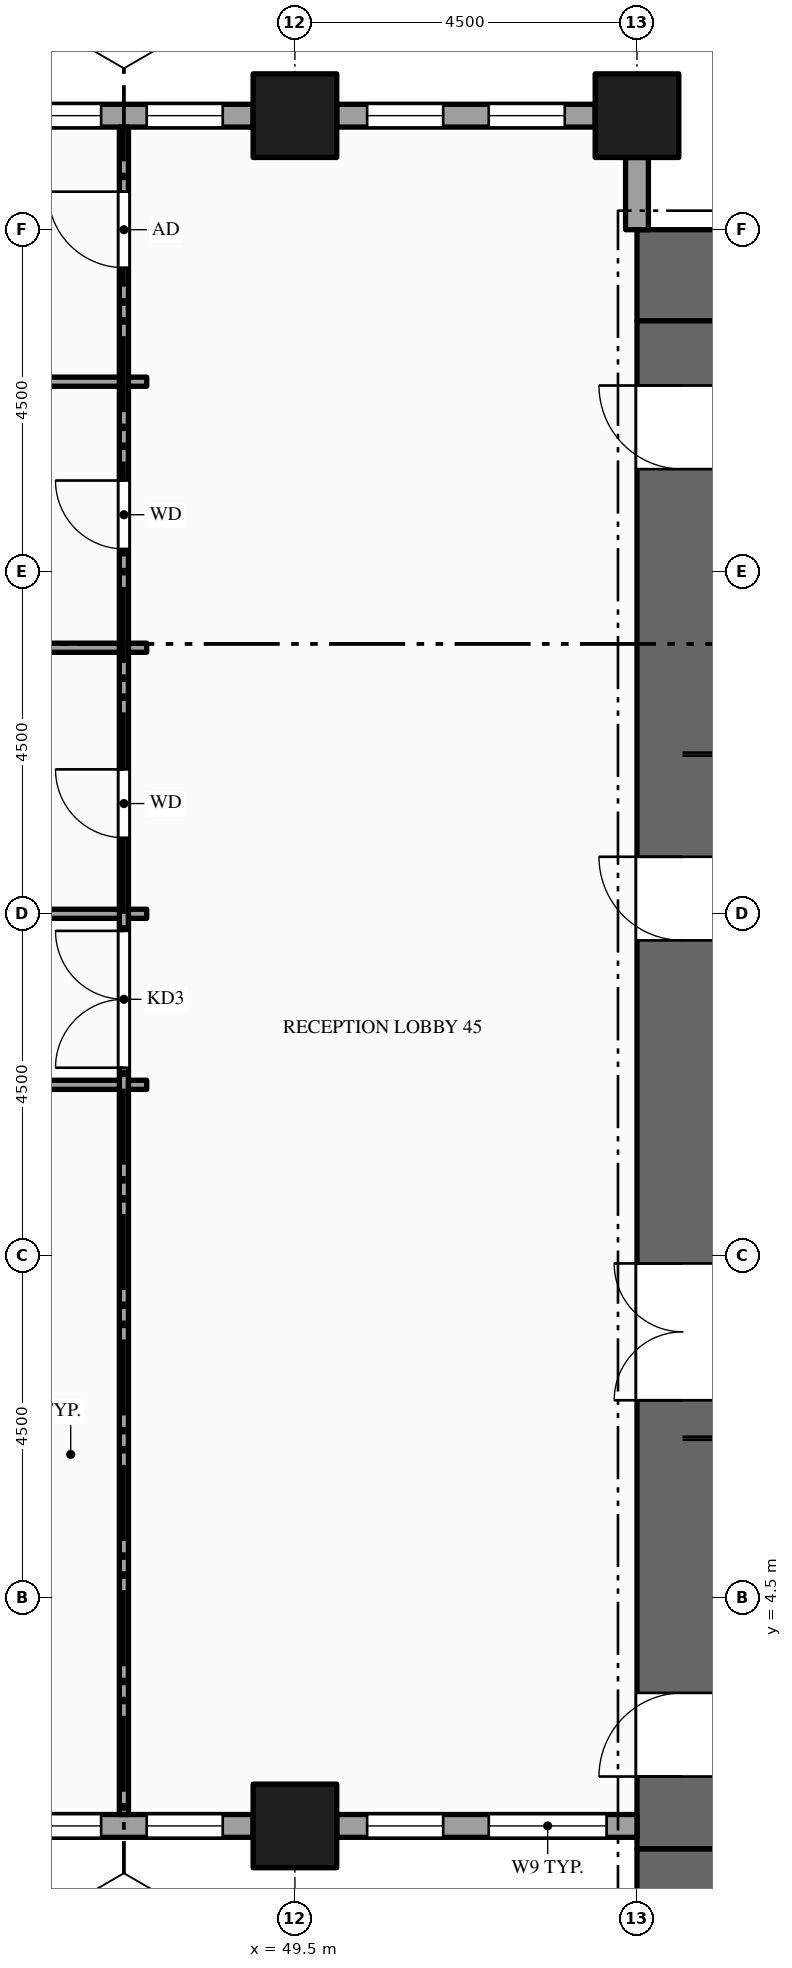
"""IFC4 building model, lengths in metres.
Left out: names, types, materials, properties, quantities, classifications, styles, units other than length and angle.
Written with IfcOpenShell. Run it as: python <this file> out.ifc"""

import sys

from ifc_helpers import new_model, si_unit, direction, frame, frame_2d, origin, origin_2d, place, context, subcontext, project, spatial, rectangle, hollow_rectangle, extrude, element, fill, save


model = new_model("IFC4")
c1 = context("Model", 3, precision=1e-05, world=origin(), true_north=direction((0.0, 1.0)))
c2 = subcontext(c1, "Body", "Model", "MODEL_VIEW")
j1 = project(units=[si_unit("LENGTHUNIT", "METRE"), si_unit("PLANEANGLEUNIT", "RADIAN")], contexts=[c1])
p1 = place(None, origin())
s1 = spatial("IfcSite", under=j1, at=p1, CompositionType="ELEMENT")
p2 = place(p1, origin())
s2 = spatial("IfcBuilding", under=s1, at=p2, CompositionType="ELEMENT")
p3 = place(p2, frame((0.0, 0.0, 41.0)))
s3 = spatial("IfcBuildingStorey", under=s2, at=p3, CompositionType="ELEMENT", Elevation=41.0)
for number, where, z_axis, x_axis in (
    (1, (67.5, 0.6, -0.15), (0.0, 0.0, 1.0), (-1.0, 0.0, 0.0)),
    (2, (54.0, 21.9, -0.15), (0.0, 0.0, 1.0), (1.0, 0.0, 0.0)),
):
    element("IfcWall", number, at=place(p3, frame(where, z_axis=z_axis, x_axis=x_axis)), inside=s3, PredefinedType="SHEAR", context=c2, shape_type="SweptSolid", body=[
        extrude(rectangle(XDim=13.5, YDim=1.2, at=frame_2d((6.75, 0.0))), origin(), (0.0, 0.0, 1.0), 4.0),
    ])
p4 = place(p3, frame((54.6, 1.2, -0.15), z_axis=(0.0, 0.0, 1.0), x_axis=(0.0, 1.0, 0.0)))
e3 = element("IfcWall", 3, at=p4, inside=s3, PredefinedType="SHEAR", context=c2, shape_type="SweptSolid", body=[
    extrude(rectangle(XDim=20.1, YDim=1.2, at=frame_2d((10.05, 0.0))), origin(), (0.0, 0.0, 1.0), 4.0),
])
p5 = place(p4, frame((5.9, 0.0, 0.15)))
e4 = element("IfcOpeningElement", 4, at=p5, cuts=e3, PredefinedType="OPENING", context=c2, shape_type="SweptSolid", body=[
    extrude(rectangle(XDim=1.8, YDim=2.1, at=frame_2d((0.9, 1.05))), frame((0.0, 0.61, 0.0), z_axis=(0.0, -1.0, 0.0), x_axis=(1.0, 0.0, 0.0)), (0.0, 0.0, 1.0), 1.22),
])
p6 = place(p4, frame((11.95, 0.0, 0.15)))
e5 = element("IfcOpeningElement", 5, at=p6, cuts=e3, PredefinedType="OPENING", context=c2, shape_type="SweptSolid", body=[
    extrude(rectangle(XDim=1.1, YDim=2.1, at=frame_2d((0.55, 1.05))), frame((0.0, 0.61, 0.0), z_axis=(0.0, -1.0, 0.0), x_axis=(1.0, 0.0, 0.0)), (0.0, 0.0, 1.0), 1.22),
])
p7 = place(p4, frame((0.95, 0.0, 0.15)))
e6 = element("IfcOpeningElement", 6, at=p7, cuts=e3, PredefinedType="OPENING", context=c2, shape_type="SweptSolid", body=[
    extrude(rectangle(XDim=1.1, YDim=2.1, at=frame_2d((0.55, 1.05))), frame((0.0, 0.61, 0.0), z_axis=(0.0, -1.0, 0.0), x_axis=(1.0, 0.0, 0.0)), (0.0, 0.0, 1.0), 1.22),
])
p8 = place(p4, frame((18.15, 0.0, 0.15)))
e7 = element("IfcOpeningElement", 7, at=p8, cuts=e3, PredefinedType="OPENING", context=c2, shape_type="SweptSolid", body=[
    extrude(rectangle(XDim=1.1, YDim=2.1, at=frame_2d((0.55, 1.05))), frame((0.0, 0.61, 0.0), z_axis=(0.0, -1.0, 0.0), x_axis=(1.0, 0.0, 0.0)), (0.0, 0.0, 1.0), 1.22),
])
for number, where, z_axis, x_axis in (
    (8, (49.5, 1.5, -0.15), (0.0, 0.0, 1.0), (1.0, 0.0, 0.0)),
    (9, (49.5, 24.0, -0.15), (0.0, 0.0, 1.0), (1.0, 0.0, 0.0)),
    (10, (54.0, 24.0, -0.15), (0.0, 0.0, 1.0), (1.0, 0.0, 0.0)),
):
    element("IfcColumn", number, at=place(p3, frame(where, z_axis=z_axis, x_axis=x_axis)), inside=s3, PredefinedType="COLUMN", context=c2, shape_type="SweptSolid", body=[
        extrude(hollow_rectangle(XDim=1.1, YDim=1.1, WallThickness=0.06, at=origin_2d()), origin(), (0.0, 0.0, 1.0), 4.0),
    ])
p9 = place(p3, frame((45.55, 1.5, 0.0), z_axis=(0.0, 0.0, 1.0), x_axis=(1.0, 0.0, 0.0)))
e11 = element("IfcWall", 11, at=p9, inside=s3, PredefinedType="STANDARD", context=c2, shape_type="SweptSolid", body=[
    extrude(rectangle(XDim=3.4, YDim=0.3, at=frame_2d((1.7, 0.0))), origin(), (0.0, 0.0, 1.0), 3.144),
])
p10 = place(p9, frame((0.4, 0.0, 0.9)))
e12 = element("IfcOpeningElement", 12, at=p10, cuts=e11, PredefinedType="OPENING", context=c2, shape_type="SweptSolid", body=[
    extrude(rectangle(XDim=1.0, YDim=2.0, at=frame_2d((0.5, 1.0))), frame((0.0, 0.16, 0.0), z_axis=(0.0, -1.0, 0.0), x_axis=(1.0, 0.0, 0.0)), (0.0, 0.0, 1.0), 0.32),
])
p11 = place(p9, frame((2.0, 0.0, 0.9)))
e13 = element("IfcOpeningElement", 13, at=p11, cuts=e11, PredefinedType="OPENING", context=c2, shape_type="SweptSolid", body=[
    extrude(rectangle(XDim=1.0, YDim=2.0, at=frame_2d((0.5, 1.0))), frame((0.0, 0.16, 0.0), z_axis=(0.0, -1.0, 0.0), x_axis=(1.0, 0.0, 0.0)), (0.0, 0.0, 1.0), 0.32),
])
p12 = place(p3, frame((50.05, 1.5, 0.0), z_axis=(0.0, 0.0, 1.0), x_axis=(1.0, 0.0, 0.0)))
e14 = element("IfcWall", 14, at=p12, inside=s3, PredefinedType="STANDARD", context=c2, shape_type="SweptSolid", body=[
    extrude(rectangle(XDim=3.95, YDim=0.3, at=frame_2d((1.975, 0.0))), origin(), (0.0, 0.0, 1.0), 3.144),
])
p13 = place(p12, frame((0.4, 0.0, 0.9)))
e15 = element("IfcOpeningElement", 15, at=p13, cuts=e14, PredefinedType="OPENING", context=c2, shape_type="SweptSolid", body=[
    extrude(rectangle(XDim=1.0, YDim=2.0, at=frame_2d((0.5, 1.0))), frame((0.0, 0.16, 0.0), z_axis=(0.0, -1.0, 0.0), x_axis=(1.0, 0.0, 0.0)), (0.0, 0.0, 1.0), 0.32),
])
p14 = place(p12, frame((2.0, 0.0, 0.9)))
e16 = element("IfcOpeningElement", 16, at=p14, cuts=e14, PredefinedType="OPENING", context=c2, shape_type="SweptSolid", body=[
    extrude(rectangle(XDim=1.55, YDim=2.0, at=frame_2d((0.775, 1.0))), frame((0.0, 0.16, 0.0), z_axis=(0.0, -1.0, 0.0), x_axis=(1.0, 0.0, 0.0)), (0.0, 0.0, 1.0), 0.32),
])
p15 = place(p3, frame((54.0, 22.5, 0.0), z_axis=(0.0, 0.0, 1.0), x_axis=(0.0, 1.0, 0.0)))
e17 = element("IfcWall", 17, at=p15, inside=s3, PredefinedType="STANDARD", context=c2, shape_type="SweptSolid", body=[
    extrude(rectangle(XDim=0.95, YDim=0.3, at=frame_2d((0.475, 0.0))), origin(), (0.0, 0.0, 1.0), 3.144),
])
p16 = place(p3, frame((53.45, 24.0, 0.0), z_axis=(0.0, 0.0, 1.0), x_axis=(-1.0, 0.0, 0.0)))
e18 = element("IfcWall", 18, at=p16, inside=s3, PredefinedType="STANDARD", context=c2, shape_type="SweptSolid", body=[
    extrude(rectangle(XDim=3.4, YDim=0.3, at=frame_2d((1.7, 0.0))), origin(), (0.0, 0.0, 1.0), 3.144),
])
p17 = place(p16, frame((0.4, 0.0, 0.9)))
e19 = element("IfcOpeningElement", 19, at=p17, cuts=e18, PredefinedType="OPENING", context=c2, shape_type="SweptSolid", body=[
    extrude(rectangle(XDim=1.0, YDim=2.0, at=frame_2d((0.5, 1.0))), frame((0.0, 0.16, 0.0), z_axis=(0.0, -1.0, 0.0), x_axis=(1.0, 0.0, 0.0)), (0.0, 0.0, 1.0), 0.32),
])
p18 = place(p16, frame((2.0, 0.0, 0.9)))
e20 = element("IfcOpeningElement", 20, at=p18, cuts=e18, PredefinedType="OPENING", context=c2, shape_type="SweptSolid", body=[
    extrude(rectangle(XDim=1.0, YDim=2.0, at=frame_2d((0.5, 1.0))), frame((0.0, 0.16, 0.0), z_axis=(0.0, -1.0, 0.0), x_axis=(1.0, 0.0, 0.0)), (0.0, 0.0, 1.0), 0.32),
])
p19 = place(p3, frame((48.95, 24.0, 0.0), z_axis=(0.0, 0.0, 1.0), x_axis=(-1.0, 0.0, 0.0)))
e21 = element("IfcWall", 21, at=p19, inside=s3, PredefinedType="STANDARD", context=c2, shape_type="SweptSolid", body=[
    extrude(rectangle(XDim=3.4, YDim=0.3, at=frame_2d((1.7, 0.0))), origin(), (0.0, 0.0, 1.0), 3.144),
])
p20 = place(p19, frame((0.4, 0.0, 0.9)))
e22 = element("IfcOpeningElement", 22, at=p20, cuts=e21, PredefinedType="OPENING", context=c2, shape_type="SweptSolid", body=[
    extrude(rectangle(XDim=1.0, YDim=2.0, at=frame_2d((0.5, 1.0))), frame((0.0, 0.16, 0.0), z_axis=(0.0, -1.0, 0.0), x_axis=(1.0, 0.0, 0.0)), (0.0, 0.0, 1.0), 0.32),
])
p21 = place(p19, frame((2.0, 0.0, 0.9)))
e23 = element("IfcOpeningElement", 23, at=p21, cuts=e21, PredefinedType="OPENING", context=c2, shape_type="SweptSolid", body=[
    extrude(rectangle(XDim=1.0, YDim=2.0, at=frame_2d((0.5, 1.0))), frame((0.0, 0.16, 0.0), z_axis=(0.0, -1.0, 0.0), x_axis=(1.0, 0.0, 0.0)), (0.0, 0.0, 1.0), 0.32),
])
p22 = place(p3, frame((47.25, 1.65, 0.0), z_axis=(0.0, 0.0, 1.0), x_axis=(0.0, 1.0, 0.0)))
e24 = element("IfcWall", 24, at=p22, inside=s3, PredefinedType="PARTITIONING", context=c2, shape_type="SweptSolid", body=[
    extrude(rectangle(XDim=22.2, YDim=0.12, at=frame_2d((11.1, 0.0))), origin(), (0.0, 0.0, 1.0), 2.938),
])
p23 = place(p22, frame((9.825, 0.0, 0.0)))
e25 = element("IfcOpeningElement", 25, at=p23, cuts=e24, PredefinedType="OPENING", context=c2, shape_type="SweptSolid", body=[
    extrude(rectangle(XDim=1.8, YDim=2.1, at=frame_2d((0.9, 1.05))), frame((0.0, 0.07, 0.0), z_axis=(0.0, -1.0, 0.0), x_axis=(1.0, 0.0, 0.0)), (0.0, 0.0, 1.0), 0.14),
])
p24 = place(p22, frame((12.85, 0.0, 0.0)))
e26 = element("IfcOpeningElement", 26, at=p24, cuts=e24, PredefinedType="OPENING", context=c2, shape_type="SweptSolid", body=[
    extrude(rectangle(XDim=0.9, YDim=2.1, at=frame_2d((0.45, 1.05))), frame((0.0, 0.07, 0.0), z_axis=(0.0, -1.0, 0.0), x_axis=(1.0, 0.0, 0.0)), (0.0, 0.0, 1.0), 0.14),
])
p25 = place(p22, frame((16.65, 0.0, 0.0)))
e27 = element("IfcOpeningElement", 27, at=p25, cuts=e24, PredefinedType="OPENING", context=c2, shape_type="SweptSolid", body=[
    extrude(rectangle(XDim=0.9, YDim=2.1, at=frame_2d((0.45, 1.05))), frame((0.0, 0.07, 0.0), z_axis=(0.0, -1.0, 0.0), x_axis=(1.0, 0.0, 0.0)), (0.0, 0.0, 1.0), 0.14),
])
p26 = place(p22, frame((20.35, 0.0, 0.0)))
e28 = element("IfcOpeningElement", 28, at=p26, cuts=e24, PredefinedType="OPENING", context=c2, shape_type="SweptSolid", body=[
    extrude(rectangle(XDim=1.0, YDim=2.1, at=frame_2d((0.5, 1.05))), frame((0.0, 0.07, 0.0), z_axis=(0.0, -1.0, 0.0), x_axis=(1.0, 0.0, 0.0)), (0.0, 0.0, 1.0), 0.14),
])
p27 = place(p3, frame((42.81, 11.25, 0.0), z_axis=(0.0, 0.0, 1.0), x_axis=(1.0, 0.0, 0.0)))
e29 = element("IfcWall", 29, at=p27, inside=s3, PredefinedType="PARTITIONING", context=c2, shape_type="SweptSolid", body=[
    extrude(rectangle(XDim=4.38, YDim=0.12, at=frame_2d((2.19, 0.0))), origin(), (0.0, 0.0, 1.0), 2.938),
])
p28 = place(p27, frame((1.59, 0.0, 0.0)))
e30 = element("IfcOpeningElement", 30, at=p28, cuts=e29, PredefinedType="OPENING", context=c2, shape_type="SweptSolid", body=[
    extrude(rectangle(XDim=1.2, YDim=2.1, at=frame_2d((0.6, 1.05))), frame((0.0, 0.07, 0.0), z_axis=(0.0, -1.0, 0.0), x_axis=(1.0, 0.0, 0.0)), (0.0, 0.0, 1.0), 0.14),
])
p29 = place(p3, frame((47.31, 11.25, 0.0), z_axis=(0.0, 0.0, 1.0), x_axis=(1.0, 0.0, 0.0)))
e31 = element("IfcWall", 31, at=p29, inside=s3, PredefinedType="PARTITIONING", context=c2, shape_type="SweptSolid", body=[
    extrude(rectangle(XDim=0.24, YDim=0.12, at=frame_2d((0.12, 0.0))), origin(), (0.0, 0.0, 1.0), 2.938),
])
p30 = place(p3, frame((42.81, 13.5, 0.0), z_axis=(0.0, 0.0, 1.0), x_axis=(1.0, 0.0, 0.0)))
e32 = element("IfcWall", 32, at=p30, inside=s3, PredefinedType="PARTITIONING", context=c2, shape_type="SweptSolid", body=[
    extrude(rectangle(XDim=4.38, YDim=0.12, at=frame_2d((2.19, 0.0))), origin(), (0.0, 0.0, 1.0), 2.938),
])
p31 = place(p3, frame((47.31, 13.5, 0.0), z_axis=(0.0, 0.0, 1.0), x_axis=(1.0, 0.0, 0.0)))
e33 = element("IfcWall", 33, at=p31, inside=s3, PredefinedType="PARTITIONING", context=c2, shape_type="SweptSolid", body=[
    extrude(rectangle(XDim=0.24, YDim=0.12, at=frame_2d((0.12, 0.0))), origin(), (0.0, 0.0, 1.0), 2.938),
])
p32 = place(p3, frame((42.81, 17.0, 0.0), z_axis=(0.0, 0.0, 1.0), x_axis=(1.0, 0.0, 0.0)))
e34 = element("IfcWall", 34, at=p32, inside=s3, PredefinedType="PARTITIONING", context=c2, shape_type="SweptSolid", body=[
    extrude(rectangle(XDim=4.38, YDim=0.12, at=frame_2d((2.19, 0.0))), origin(), (0.0, 0.0, 1.0), 2.938),
])
p33 = place(p3, frame((47.31, 17.0, 0.0), z_axis=(0.0, 0.0, 1.0), x_axis=(1.0, 0.0, 0.0)))
e35 = element("IfcWall", 35, at=p33, inside=s3, PredefinedType="PARTITIONING", context=c2, shape_type="SweptSolid", body=[
    extrude(rectangle(XDim=0.24, YDim=0.12, at=frame_2d((0.12, 0.0))), origin(), (0.0, 0.0, 1.0), 2.938),
])
p34 = place(p3, frame((42.81, 20.5, 0.0), z_axis=(0.0, 0.0, 1.0), x_axis=(1.0, 0.0, 0.0)))
e36 = element("IfcWall", 36, at=p34, inside=s3, PredefinedType="PARTITIONING", context=c2, shape_type="SweptSolid", body=[
    extrude(rectangle(XDim=4.38, YDim=0.12, at=frame_2d((2.19, 0.0))), origin(), (0.0, 0.0, 1.0), 2.938),
])
p35 = place(p3, frame((47.31, 20.5, 0.0), z_axis=(0.0, 0.0, 1.0), x_axis=(1.0, 0.0, 0.0)))
e37 = element("IfcWall", 37, at=p35, inside=s3, PredefinedType="PARTITIONING", context=c2, shape_type="SweptSolid", body=[
    extrude(rectangle(XDim=0.24, YDim=0.12, at=frame_2d((0.12, 0.0))), origin(), (0.0, 0.0, 1.0), 2.938),
])
p36 = place(p10, origin())
e38 = element("IfcWindow", 38, at=p36, inside=s3, PartitioningType="SINGLE_PANEL", PredefinedType="WINDOW", context=c2, shape_type="SweptSolid", body=[
    extrude(rectangle(XDim=1.0, YDim=2.0, at=frame_2d((0.5, 1.0))), frame((0.0, 0.03, 0.0), z_axis=(0.0, -1.0, 0.0), x_axis=(1.0, 0.0, 0.0)), (0.0, 0.0, 1.0), 0.06),
])
fill(e12, e38)
p37 = place(p11, origin())
e39 = element("IfcWindow", 39, at=p37, inside=s3, PartitioningType="SINGLE_PANEL", PredefinedType="WINDOW", context=c2, shape_type="SweptSolid", body=[
    extrude(rectangle(XDim=1.0, YDim=2.0, at=frame_2d((0.5, 1.0))), frame((0.0, 0.03, 0.0), z_axis=(0.0, -1.0, 0.0), x_axis=(1.0, 0.0, 0.0)), (0.0, 0.0, 1.0), 0.06),
])
fill(e13, e39)
p38 = place(p13, origin())
e40 = element("IfcWindow", 40, at=p38, inside=s3, PartitioningType="SINGLE_PANEL", PredefinedType="WINDOW", context=c2, shape_type="SweptSolid", body=[
    extrude(rectangle(XDim=1.0, YDim=2.0, at=frame_2d((0.5, 1.0))), frame((0.0, 0.03, 0.0), z_axis=(0.0, -1.0, 0.0), x_axis=(1.0, 0.0, 0.0)), (0.0, 0.0, 1.0), 0.06),
])
fill(e15, e40)
p39 = place(p14, origin())
e41 = element("IfcWindow", 41, at=p39, inside=s3, PartitioningType="SINGLE_PANEL", PredefinedType="WINDOW", context=c2, shape_type="SweptSolid", body=[
    extrude(rectangle(XDim=1.55, YDim=2.0, at=frame_2d((0.775, 1.0))), frame((0.0, 0.03, 0.0), z_axis=(0.0, -1.0, 0.0), x_axis=(1.0, 0.0, 0.0)), (0.0, 0.0, 1.0), 0.06),
])
fill(e16, e41)
p40 = place(p17, origin())
e42 = element("IfcWindow", 42, at=p40, inside=s3, PartitioningType="SINGLE_PANEL", PredefinedType="WINDOW", context=c2, shape_type="SweptSolid", body=[
    extrude(rectangle(XDim=1.0, YDim=2.0, at=frame_2d((0.5, 1.0))), frame((0.0, 0.03, 0.0), z_axis=(0.0, -1.0, 0.0), x_axis=(1.0, 0.0, 0.0)), (0.0, 0.0, 1.0), 0.06),
])
fill(e19, e42)
p41 = place(p18, origin())
e43 = element("IfcWindow", 43, at=p41, inside=s3, PartitioningType="SINGLE_PANEL", PredefinedType="WINDOW", context=c2, shape_type="SweptSolid", body=[
    extrude(rectangle(XDim=1.0, YDim=2.0, at=frame_2d((0.5, 1.0))), frame((0.0, 0.03, 0.0), z_axis=(0.0, -1.0, 0.0), x_axis=(1.0, 0.0, 0.0)), (0.0, 0.0, 1.0), 0.06),
])
fill(e20, e43)
p42 = place(p20, origin())
e44 = element("IfcWindow", 44, at=p42, inside=s3, PartitioningType="SINGLE_PANEL", PredefinedType="WINDOW", context=c2, shape_type="SweptSolid", body=[
    extrude(rectangle(XDim=1.0, YDim=2.0, at=frame_2d((0.5, 1.0))), frame((0.0, 0.03, 0.0), z_axis=(0.0, -1.0, 0.0), x_axis=(1.0, 0.0, 0.0)), (0.0, 0.0, 1.0), 0.06),
])
fill(e22, e44)
p43 = place(p21, origin())
e45 = element("IfcWindow", 45, at=p43, inside=s3, PartitioningType="SINGLE_PANEL", PredefinedType="WINDOW", context=c2, shape_type="SweptSolid", body=[
    extrude(rectangle(XDim=1.0, YDim=2.0, at=frame_2d((0.5, 1.0))), frame((0.0, 0.03, 0.0), z_axis=(0.0, -1.0, 0.0), x_axis=(1.0, 0.0, 0.0)), (0.0, 0.0, 1.0), 0.06),
])
fill(e23, e45)
p44 = place(p5, origin())
e46 = element("IfcDoor", 46, at=p44, inside=s3, OperationType="DOUBLE_DOOR_SINGLE_SWING", PredefinedType="DOOR", context=c2, shape_type="SweptSolid", body=[
    extrude(rectangle(XDim=1.8, YDim=2.1, at=frame_2d((0.9, 1.05))), frame((0.0, 0.025, 0.0), z_axis=(0.0, -1.0, 0.0), x_axis=(1.0, 0.0, 0.0)), (0.0, 0.0, 1.0), 0.05),
])
fill(e4, e46)
p45 = place(p6, origin())
e47 = element("IfcDoor", 47, at=p45, inside=s3, OperationType="SINGLE_SWING_RIGHT", PredefinedType="DOOR", context=c2, shape_type="SweptSolid", body=[
    extrude(rectangle(XDim=1.1, YDim=2.1, at=frame_2d((0.55, 1.05))), frame((0.0, 0.025, 0.0), z_axis=(0.0, -1.0, 0.0), x_axis=(1.0, 0.0, 0.0)), (0.0, 0.0, 1.0), 0.05),
])
fill(e5, e47)
p46 = place(p7, origin())
e48 = element("IfcDoor", 48, at=p46, inside=s3, OperationType="SINGLE_SWING_LEFT", PredefinedType="DOOR", context=c2, shape_type="SweptSolid", body=[
    extrude(rectangle(XDim=1.1, YDim=2.1, at=frame_2d((0.55, 1.05))), frame((0.0, 0.025, 0.0), z_axis=(0.0, -1.0, 0.0), x_axis=(1.0, 0.0, 0.0)), (0.0, 0.0, 1.0), 0.05),
])
fill(e6, e48)
p47 = place(p8, origin())
e49 = element("IfcDoor", 49, at=p47, inside=s3, OperationType="SINGLE_SWING_RIGHT", PredefinedType="DOOR", context=c2, shape_type="SweptSolid", body=[
    extrude(rectangle(XDim=1.1, YDim=2.1, at=frame_2d((0.55, 1.05))), frame((0.0, 0.025, 0.0), z_axis=(0.0, -1.0, 0.0), x_axis=(1.0, 0.0, 0.0)), (0.0, 0.0, 1.0), 0.05),
])
fill(e7, e49)
p48 = place(p23, origin())
e50 = element("IfcDoor", 50, at=p48, inside=s3, OperationType="DOUBLE_DOOR_SINGLE_SWING", PredefinedType="DOOR", context=c2, shape_type="SweptSolid", body=[
    extrude(rectangle(XDim=1.8, YDim=2.1, at=frame_2d((0.9, 1.05))), frame((0.0, 0.025, 0.0), z_axis=(0.0, -1.0, 0.0), x_axis=(1.0, 0.0, 0.0)), (0.0, 0.0, 1.0), 0.05),
])
fill(e25, e50)
p49 = place(p24, origin())
e51 = element("IfcDoor", 51, at=p49, inside=s3, OperationType="SINGLE_SWING_RIGHT", PredefinedType="DOOR", context=c2, shape_type="SweptSolid", body=[
    extrude(rectangle(XDim=0.9, YDim=2.1, at=frame_2d((0.45, 1.05))), frame((0.0, 0.025, 0.0), z_axis=(0.0, -1.0, 0.0), x_axis=(1.0, 0.0, 0.0)), (0.0, 0.0, 1.0), 0.05),
])
fill(e26, e51)
p50 = place(p25, origin())
e52 = element("IfcDoor", 52, at=p50, inside=s3, OperationType="SINGLE_SWING_RIGHT", PredefinedType="DOOR", context=c2, shape_type="SweptSolid", body=[
    extrude(rectangle(XDim=0.9, YDim=2.1, at=frame_2d((0.45, 1.05))), frame((0.0, 0.025, 0.0), z_axis=(0.0, -1.0, 0.0), x_axis=(1.0, 0.0, 0.0)), (0.0, 0.0, 1.0), 0.05),
])
fill(e27, e52)
p51 = place(p26, origin())
e53 = element("IfcDoor", 53, at=p51, inside=s3, OperationType="SINGLE_SWING_RIGHT", PredefinedType="DOOR", context=c2, shape_type="SweptSolid", body=[
    extrude(rectangle(XDim=1.0, YDim=2.1, at=frame_2d((0.5, 1.05))), frame((0.0, 0.025, 0.0), z_axis=(0.0, -1.0, 0.0), x_axis=(1.0, 0.0, 0.0)), (0.0, 0.0, 1.0), 0.05),
])
fill(e28, e53)
save(model, sys.argv[1])
